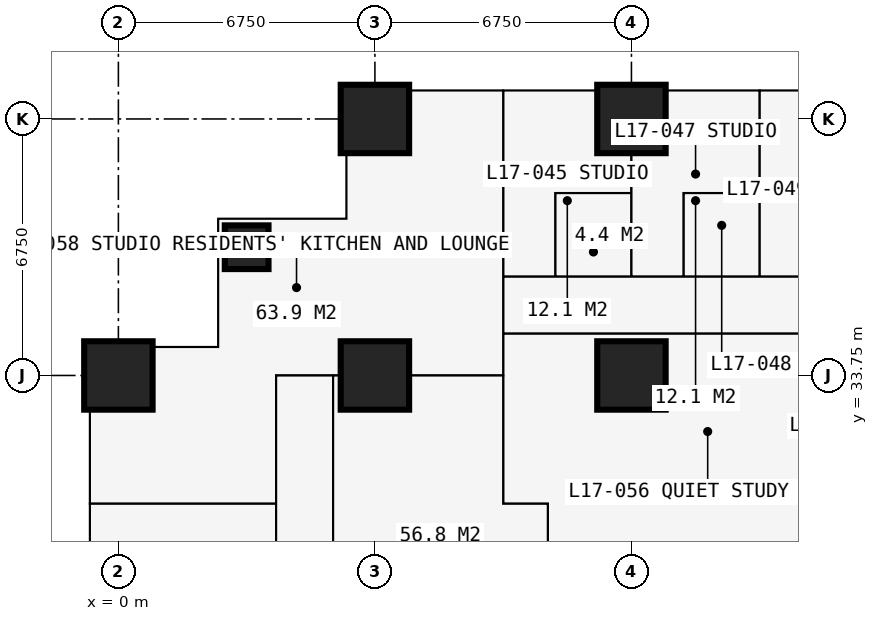
"""IFC4 building model, lengths in metres.
Left out: names, types, materials, properties, quantities, classifications, styles, units other than length and angle.
Written with IfcOpenShell. Run it as: python <this file> out.ifc"""

import sys

from ifc_helpers import new_model, si_unit, direction, frame, frame_2d, origin, origin_2d, place, context, subcontext, project, spatial, rectangle, extrude, element, fill, save


model = new_model("IFC4")
c1 = context("Model", 3, precision=1e-05, world=origin(), true_north=direction((0.0, 1.0)))
c2 = subcontext(c1, "Body", "Model", "MODEL_VIEW")
j1 = project(units=[si_unit("LENGTHUNIT", "METRE"), si_unit("PLANEANGLEUNIT", "RADIAN")], contexts=[c1])
p1 = place(None, origin())
s1 = spatial("IfcSite", under=j1, at=p1, CompositionType="ELEMENT")
p2 = place(p1, origin())
s2 = spatial("IfcBuilding", under=s1, at=p2, CompositionType="ELEMENT")
p3 = place(p2, frame((0.0, 0.0, 64.8)))
s3 = spatial("IfcBuildingStorey", under=s2, at=p3, CompositionType="ELEMENT", Elevation=64.8)
p4 = place(p3, frame((0.0, 33.75, 0.0), z_axis=(0.0, 0.0, 1.0), x_axis=(1.0, 0.0, 0.0)))
e1 = element("IfcColumn", 1, at=p4, inside=s3, PredefinedType="COLUMN", context=c2, shape_type="SweptSolid", body=[
    extrude(rectangle(XDim=1.8, YDim=1.8, at=origin_2d()), origin(), (0.0, 0.0, 1.0), 3.6),
])
p5 = place(p3, frame((3.375, 37.125, 0.0), z_axis=(0.0, 0.0, 1.0), x_axis=(1.0, 0.0, 0.0)))
e2 = element("IfcColumn", 2, at=p5, inside=s3, PredefinedType="COLUMN", context=c2, shape_type="SweptSolid", body=[
    extrude(rectangle(XDim=1.15, YDim=1.15, at=origin_2d()), origin(), (0.0, 0.0, 1.0), 3.6),
])
for number, where, z_axis, x_axis in (
    (3, (6.75, 33.75, 0.0), (0.0, 0.0, 1.0), (1.0, 0.0, 0.0)),
    (4, (6.75, 40.5, 0.0), (0.0, 0.0, 1.0), (1.0, 0.0, 0.0)),
    (5, (13.5, 33.75, 0.0), (0.0, 0.0, 1.0), (1.0, 0.0, 0.0)),
    (6, (13.5, 40.5, 0.0), (0.0, 0.0, 1.0), (1.0, 0.0, 0.0)),
):
    element("IfcColumn", number, at=place(p3, frame(where, z_axis=z_axis, x_axis=x_axis)), inside=s3, PredefinedType="COLUMN", context=c2, shape_type="SweptSolid", body=[
        extrude(rectangle(XDim=1.8, YDim=1.8, at=origin_2d()), origin(), (0.0, 0.0, 1.0), 3.6),
    ])
p6 = place(p3, frame((6.0, 41.25, 0.0), z_axis=(0.0, 0.0, 1.0), x_axis=(0.0, -1.0, 0.0)))
e7 = element("IfcWall", 7, at=p6, inside=s3, PredefinedType="SOLIDWALL", context=c2, shape_type="SweptSolid", body=[
    extrude(rectangle(XDim=3.375, YDim=0.3, at=frame_2d((1.688, 0.0))), origin(), (0.0, 0.0, 1.0), 3.375),
])
p7 = place(p6, frame((1.833, 0.0, 0.9)))
e8 = element("IfcOpeningElement", 8, at=p7, cuts=e7, PredefinedType="OPENING", context=c2, shape_type="SweptSolid", body=[
    extrude(rectangle(XDim=1.2, YDim=1.8, at=frame_2d((0.6, 0.9))), frame((0.0, 0.16, 0.0), z_axis=(0.0, -1.0, 0.0), x_axis=(1.0, 0.0, 0.0)), (0.0, 0.0, 1.0), 0.32),
])
p8 = place(p3, frame((6.0, 37.875, 0.0), z_axis=(0.0, 0.0, 1.0), x_axis=(-1.0, 0.0, 0.0)))
e9 = element("IfcWall", 9, at=p8, inside=s3, PredefinedType="SOLIDWALL", context=c2, shape_type="SweptSolid", body=[
    extrude(rectangle(XDim=3.375, YDim=0.3, at=frame_2d((1.688, 0.0))), origin(), (0.0, 0.0, 1.0), 3.375),
])
p9 = place(p8, frame((0.788, 0.0, 0.6)))
e10 = element("IfcOpeningElement", 10, at=p9, cuts=e9, PredefinedType="OPENING", context=c2, shape_type="SweptSolid", body=[
    extrude(rectangle(XDim=1.8, YDim=2.1, at=frame_2d((0.9, 1.05))), frame((0.0, 0.16, 0.0), z_axis=(0.0, -1.0, 0.0), x_axis=(1.0, 0.0, 0.0)), (0.0, 0.0, 1.0), 0.32),
])
p10 = place(p3, frame((2.625, 37.875, 0.0), z_axis=(0.0, 0.0, 1.0), x_axis=(0.0, -1.0, 0.0)))
e11 = element("IfcWall", 11, at=p10, inside=s3, PredefinedType="SOLIDWALL", context=c2, shape_type="SweptSolid", body=[
    extrude(rectangle(XDim=3.375, YDim=0.3, at=frame_2d((1.688, 0.0))), origin(), (0.0, 0.0, 1.0), 3.375),
])
p11 = place(p10, frame((0.788, 0.0, 0.6)))
e12 = element("IfcOpeningElement", 12, at=p11, cuts=e11, PredefinedType="OPENING", context=c2, shape_type="SweptSolid", body=[
    extrude(rectangle(XDim=1.8, YDim=2.1, at=frame_2d((0.9, 1.05))), frame((0.0, 0.16, 0.0), z_axis=(0.0, -1.0, 0.0), x_axis=(1.0, 0.0, 0.0)), (0.0, 0.0, 1.0), 0.32),
])
p12 = place(p3, frame((2.625, 34.5, 0.0), z_axis=(0.0, 0.0, 1.0), x_axis=(-1.0, 0.0, 0.0)))
e13 = element("IfcWall", 13, at=p12, inside=s3, PredefinedType="SOLIDWALL", context=c2, shape_type="SweptSolid", body=[
    extrude(rectangle(XDim=3.375, YDim=0.3, at=frame_2d((1.688, 0.0))), origin(), (0.0, 0.0, 1.0), 3.375),
])
p13 = place(p12, frame((0.343, 0.0, 0.9)))
e14 = element("IfcOpeningElement", 14, at=p13, cuts=e13, PredefinedType="OPENING", context=c2, shape_type="SweptSolid", body=[
    extrude(rectangle(XDim=1.2, YDim=1.8, at=frame_2d((0.6, 0.9))), frame((0.0, 0.16, 0.0), z_axis=(0.0, -1.0, 0.0), x_axis=(1.0, 0.0, 0.0)), (0.0, 0.0, 1.0), 0.32),
])
p14 = place(p3, frame((-0.734, 30.375, 0.0), z_axis=(0.0, 0.0, 1.0), x_axis=(1.0, 0.0, 0.0)))
e15 = element("IfcWall", 15, at=p14, inside=s3, PredefinedType="PARTITIONING", context=c2, shape_type="SweptSolid", body=[
    extrude(rectangle(XDim=4.884, YDim=0.15, at=frame_2d((2.442, 0.0))), origin(), (0.0, 0.0, 1.0), 3.375),
])
p15 = place(p3, frame((4.15, 10.125, 0.0), z_axis=(0.0, 0.0, 1.0), x_axis=(0.0, 1.0, 0.0)))
e16 = element("IfcWall", 16, at=p15, inside=s3, PredefinedType="PARTITIONING", context=c2, shape_type="SweptSolid", body=[
    extrude(rectangle(XDim=23.625, YDim=0.15, at=frame_2d((11.812, 0.0))), origin(), (0.0, 0.0, 1.0), 3.375),
])
p16 = place(p15, frame((4.2, 0.0, 0.0)))
e17 = element("IfcOpeningElement", 17, at=p16, cuts=e16, PredefinedType="OPENING", context=c2, shape_type="SweptSolid", body=[
    extrude(rectangle(XDim=0.95, YDim=2.2, at=frame_2d((0.475, 1.1))), frame((0.0, 0.085, 0.0), z_axis=(0.0, -1.0, 0.0), x_axis=(1.0, 0.0, 0.0)), (0.0, 0.0, 1.0), 0.17),
])
p17 = place(p15, frame((10.95, 0.0, 0.0)))
e18 = element("IfcOpeningElement", 18, at=p17, cuts=e16, PredefinedType="OPENING", context=c2, shape_type="SweptSolid", body=[
    extrude(rectangle(XDim=0.95, YDim=2.2, at=frame_2d((0.475, 1.1))), frame((0.0, 0.085, 0.0), z_axis=(0.0, -1.0, 0.0), x_axis=(1.0, 0.0, 0.0)), (0.0, 0.0, 1.0), 0.17),
])
p18 = place(p15, frame((17.7, 0.0, 0.0)))
e19 = element("IfcOpeningElement", 19, at=p18, cuts=e16, PredefinedType="OPENING", context=c2, shape_type="SweptSolid", body=[
    extrude(rectangle(XDim=0.95, YDim=2.2, at=frame_2d((0.475, 1.1))), frame((0.0, 0.085, 0.0), z_axis=(0.0, -1.0, 0.0), x_axis=(1.0, 0.0, 0.0)), (0.0, 0.0, 1.0), 0.17),
])
p19 = place(p3, frame((4.15, 33.75, 0.0), z_axis=(0.0, 0.0, 1.0), x_axis=(1.0, 0.0, 0.0)))
e20 = element("IfcWall", 20, at=p19, inside=s3, PredefinedType="PARTITIONING", context=c2, shape_type="SweptSolid", body=[
    extrude(rectangle(XDim=5.975, YDim=0.15, at=frame_2d((2.988, 0.0))), origin(), (0.0, 0.0, 1.0), 2.877),
])
p20 = place(p3, frame((5.65, 22.988, 0.0), z_axis=(0.0, 0.0, 1.0), x_axis=(0.0, 1.0, 0.0)))
e21 = element("IfcWall", 21, at=p20, inside=s3, PredefinedType="PARTITIONING", context=c2, shape_type="SweptSolid", body=[
    extrude(rectangle(XDim=10.762, YDim=0.15, at=frame_2d((5.381, 0.0))), origin(), (0.0, 0.0, 1.0), 3.375),
])
p21 = place(p20, frame((4.95, 0.0, 0.0)))
e22 = element("IfcOpeningElement", 22, at=p21, cuts=e21, PredefinedType="OPENING", context=c2, shape_type="SweptSolid", body=[
    extrude(rectangle(XDim=0.95, YDim=2.2, at=frame_2d((0.475, 1.1))), frame((0.0, 0.085, 0.0), z_axis=(0.0, -1.0, 0.0), x_axis=(1.0, 0.0, 0.0)), (0.0, 0.0, 1.0), 0.17),
])
p22 = place(p3, frame((10.125, 30.375, 0.0), z_axis=(0.0, 0.0, 1.0), x_axis=(0.0, 1.0, 0.0)))
e23 = element("IfcWall", 23, at=p22, inside=s3, PredefinedType="PARTITIONING", context=c2, shape_type="SweptSolid", body=[
    extrude(rectangle(XDim=10.859, YDim=0.15, at=frame_2d((5.429, 0.0))), origin(), (0.0, 0.0, 1.0), 3.375),
])
p23 = place(p22, frame((4.725, 0.0, 0.0)))
e24 = element("IfcOpeningElement", 24, at=p23, cuts=e23, PredefinedType="OPENING", context=c2, shape_type="SweptSolid", body=[
    extrude(rectangle(XDim=1.0, YDim=2.2, at=frame_2d((0.5, 1.1))), frame((0.0, 0.085, 0.0), z_axis=(0.0, -1.0, 0.0), x_axis=(1.0, 0.0, 0.0)), (0.0, 0.0, 1.0), 0.17),
])
p24 = place(p3, frame((10.125, 30.375, 0.0), z_axis=(0.0, 0.0, 1.0), x_axis=(1.0, 0.0, 0.0)))
e25 = element("IfcWall", 25, at=p24, inside=s3, PredefinedType="PARTITIONING", context=c2, shape_type="SweptSolid", body=[
    extrude(rectangle(XDim=1.175, YDim=0.15, at=frame_2d((0.587, 0.0))), origin(), (0.0, 0.0, 1.0), 3.375),
])
p25 = place(p3, frame((10.125, 34.85, 0.0), z_axis=(0.0, 0.0, 1.0), x_axis=(1.0, 0.0, 0.0)))
e26 = element("IfcWall", 26, at=p25, inside=s3, PredefinedType="PARTITIONING", context=c2, shape_type="SweptSolid", body=[
    extrude(rectangle(XDim=10.762, YDim=0.15, at=frame_2d((5.381, 0.0))), origin(), (0.0, 0.0, 1.0), 3.375),
])
p26 = place(p25, frame((4.9, 0.0, 0.0)))
e27 = element("IfcOpeningElement", 27, at=p26, cuts=e26, PredefinedType="OPENING", context=c2, shape_type="SweptSolid", body=[
    extrude(rectangle(XDim=0.95, YDim=2.2, at=frame_2d((0.475, 1.1))), frame((0.0, 0.085, 0.0), z_axis=(0.0, -1.0, 0.0), x_axis=(1.0, 0.0, 0.0)), (0.0, 0.0, 1.0), 0.17),
])
p27 = place(p3, frame((10.125, 36.35, 0.0), z_axis=(0.0, 0.0, 1.0), x_axis=(1.0, 0.0, 0.0)))
e28 = element("IfcWall", 28, at=p27, inside=s3, PredefinedType="PARTITIONING", context=c2, shape_type="SweptSolid", body=[
    extrude(rectangle(XDim=23.625, YDim=0.1, at=frame_2d((11.812, 0.0))), origin(), (0.0, 0.0, 1.0), 3.375),
])
p28 = place(p27, frame((0.2, 0.0, 0.0)))
e29 = element("IfcOpeningElement", 29, at=p28, cuts=e28, PredefinedType="OPENING", context=c2, shape_type="SweptSolid", body=[
    extrude(rectangle(XDim=0.95, YDim=2.2, at=frame_2d((0.475, 1.1))), frame((0.0, 0.06, 0.0), z_axis=(0.0, -1.0, 0.0), x_axis=(1.0, 0.0, 0.0)), (0.0, 0.0, 1.0), 0.12),
])
p29 = place(p27, frame((3.625, 0.0, 0.0)))
e30 = element("IfcOpeningElement", 30, at=p29, cuts=e28, PredefinedType="OPENING", context=c2, shape_type="SweptSolid", body=[
    extrude(rectangle(XDim=0.95, YDim=2.2, at=frame_2d((0.475, 1.1))), frame((0.0, 0.06, 0.0), z_axis=(0.0, -1.0, 0.0), x_axis=(1.0, 0.0, 0.0)), (0.0, 0.0, 1.0), 0.12),
])
p30 = place(p27, frame((7.0, 0.0, 0.0)))
e31 = element("IfcOpeningElement", 31, at=p30, cuts=e28, PredefinedType="OPENING", context=c2, shape_type="SweptSolid", body=[
    extrude(rectangle(XDim=0.95, YDim=2.2, at=frame_2d((0.475, 1.1))), frame((0.0, 0.06, 0.0), z_axis=(0.0, -1.0, 0.0), x_axis=(1.0, 0.0, 0.0)), (0.0, 0.0, 1.0), 0.12),
])
p31 = place(p27, frame((10.375, 0.0, 0.0)))
e32 = element("IfcOpeningElement", 32, at=p31, cuts=e28, PredefinedType="OPENING", context=c2, shape_type="SweptSolid", body=[
    extrude(rectangle(XDim=0.95, YDim=2.2, at=frame_2d((0.475, 1.1))), frame((0.0, 0.06, 0.0), z_axis=(0.0, -1.0, 0.0), x_axis=(1.0, 0.0, 0.0)), (0.0, 0.0, 1.0), 0.12),
])
p32 = place(p27, frame((13.75, 0.0, 0.0)))
e33 = element("IfcOpeningElement", 33, at=p32, cuts=e28, PredefinedType="OPENING", context=c2, shape_type="SweptSolid", body=[
    extrude(rectangle(XDim=0.95, YDim=2.2, at=frame_2d((0.475, 1.1))), frame((0.0, 0.06, 0.0), z_axis=(0.0, -1.0, 0.0), x_axis=(1.0, 0.0, 0.0)), (0.0, 0.0, 1.0), 0.12),
])
p33 = place(p3, frame((11.3, 11.3, 0.0), z_axis=(0.0, 0.0, 1.0), x_axis=(0.0, 1.0, 0.0)))
e34 = element("IfcWall", 34, at=p33, inside=s3, PredefinedType="PARTITIONING", context=c2, shape_type="SweptSolid", body=[
    extrude(rectangle(XDim=19.075, YDim=0.15, at=frame_2d((9.538, 0.0))), origin(), (0.0, 0.0, 1.0), 3.375),
])
p34 = place(p33, frame((10.137, 0.0, 0.0)))
e35 = element("IfcOpeningElement", 35, at=p34, cuts=e34, PredefinedType="OPENING", context=c2, shape_type="SweptSolid", body=[
    extrude(rectangle(XDim=1.0, YDim=2.2, at=frame_2d((0.5, 1.1))), frame((0.0, 0.085, 0.0), z_axis=(0.0, -1.0, 0.0), x_axis=(1.0, 0.0, 0.0)), (0.0, 0.0, 1.0), 0.17),
])
p35 = place(p3, frame((11.5, 36.35, 0.0), z_axis=(0.0, 0.0, 1.0), x_axis=(0.0, 1.0, 0.0)))
e36 = element("IfcWall", 36, at=p35, inside=s3, PredefinedType="PARTITIONING", context=c2, shape_type="SweptSolid", body=[
    extrude(rectangle(XDim=2.2, YDim=0.1, at=frame_2d((1.1, 0.0))), origin(), (0.0, 0.0, 1.0), 3.375),
])
p36 = place(p35, frame((0.65, 0.0, 0.0)))
e37 = element("IfcOpeningElement", 37, at=p36, cuts=e36, PredefinedType="OPENING", context=c2, shape_type="SweptSolid", body=[
    extrude(rectangle(XDim=0.9, YDim=2.2, at=frame_2d((0.45, 1.1))), frame((0.0, 0.06, 0.0), z_axis=(0.0, -1.0, 0.0), x_axis=(1.0, 0.0, 0.0)), (0.0, 0.0, 1.0), 0.12),
])
p37 = place(p3, frame((11.5, 38.55, 0.0), z_axis=(0.0, 0.0, 1.0), x_axis=(1.0, 0.0, 0.0)))
e38 = element("IfcWall", 38, at=p37, inside=s3, PredefinedType="PARTITIONING", context=c2, shape_type="SweptSolid", body=[
    extrude(rectangle(XDim=2.0, YDim=0.1, at=frame_2d((1.0, 0.0))), origin(), (0.0, 0.0, 1.0), 3.375),
])
p38 = place(p3, frame((13.5, 36.35, 0.0), z_axis=(0.0, 0.0, 1.0), x_axis=(0.0, 1.0, 0.0)))
e39 = element("IfcWall", 39, at=p38, inside=s3, PredefinedType="PARTITIONING", context=c2, shape_type="SweptSolid", body=[
    extrude(rectangle(XDim=4.884, YDim=0.175, at=frame_2d((2.442, 0.0))), origin(), (0.0, 0.0, 1.0), 2.61),
])
p39 = place(p3, frame((14.875, 36.35, 0.0), z_axis=(0.0, 0.0, 1.0), x_axis=(0.0, 1.0, 0.0)))
e40 = element("IfcWall", 40, at=p39, inside=s3, PredefinedType="PARTITIONING", context=c2, shape_type="SweptSolid", body=[
    extrude(rectangle(XDim=2.2, YDim=0.1, at=frame_2d((1.1, 0.0))), origin(), (0.0, 0.0, 1.0), 3.375),
])
p40 = place(p39, frame((0.65, 0.0, 0.0)))
e41 = element("IfcOpeningElement", 41, at=p40, cuts=e40, PredefinedType="OPENING", context=c2, shape_type="SweptSolid", body=[
    extrude(rectangle(XDim=0.9, YDim=2.2, at=frame_2d((0.45, 1.1))), frame((0.0, 0.06, 0.0), z_axis=(0.0, -1.0, 0.0), x_axis=(1.0, 0.0, 0.0)), (0.0, 0.0, 1.0), 0.12),
])
p41 = place(p3, frame((14.875, 38.55, 0.0), z_axis=(0.0, 0.0, 1.0), x_axis=(1.0, 0.0, 0.0)))
e42 = element("IfcWall", 42, at=p41, inside=s3, PredefinedType="PARTITIONING", context=c2, shape_type="SweptSolid", body=[
    extrude(rectangle(XDim=2.0, YDim=0.1, at=frame_2d((1.0, 0.0))), origin(), (0.0, 0.0, 1.0), 3.375),
])
p42 = place(p3, frame((16.875, 36.35, 0.0), z_axis=(0.0, 0.0, 1.0), x_axis=(0.0, 1.0, 0.0)))
e43 = element("IfcWall", 43, at=p42, inside=s3, PredefinedType="PARTITIONING", context=c2, shape_type="SweptSolid", body=[
    extrude(rectangle(XDim=4.884, YDim=0.175, at=frame_2d((2.442, 0.0))), origin(), (0.0, 0.0, 1.0), 3.375),
])
p43 = place(p7, origin())
e44 = element("IfcWindow", 44, at=p43, inside=s3, PartitioningType="SINGLE_PANEL", PredefinedType="WINDOW", context=c2, shape_type="SweptSolid", body=[
    extrude(rectangle(XDim=1.2, YDim=1.8, at=frame_2d((0.6, 0.9))), frame((0.0, 0.03, 0.0), z_axis=(0.0, -1.0, 0.0), x_axis=(1.0, 0.0, 0.0)), (0.0, 0.0, 1.0), 0.06),
])
fill(e8, e44)
p44 = place(p9, origin())
e45 = element("IfcWindow", 45, at=p44, inside=s3, PartitioningType="SINGLE_PANEL", PredefinedType="WINDOW", context=c2, shape_type="SweptSolid", body=[
    extrude(rectangle(XDim=1.8, YDim=2.1, at=frame_2d((0.9, 1.05))), frame((0.0, 0.03, 0.0), z_axis=(0.0, -1.0, 0.0), x_axis=(1.0, 0.0, 0.0)), (0.0, 0.0, 1.0), 0.06),
])
fill(e10, e45)
p45 = place(p11, origin())
e46 = element("IfcWindow", 46, at=p45, inside=s3, PartitioningType="SINGLE_PANEL", PredefinedType="WINDOW", context=c2, shape_type="SweptSolid", body=[
    extrude(rectangle(XDim=1.8, YDim=2.1, at=frame_2d((0.9, 1.05))), frame((0.0, 0.03, 0.0), z_axis=(0.0, -1.0, 0.0), x_axis=(1.0, 0.0, 0.0)), (0.0, 0.0, 1.0), 0.06),
])
fill(e12, e46)
p46 = place(p13, origin())
e47 = element("IfcWindow", 47, at=p46, inside=s3, PartitioningType="SINGLE_PANEL", PredefinedType="WINDOW", context=c2, shape_type="SweptSolid", body=[
    extrude(rectangle(XDim=1.2, YDim=1.8, at=frame_2d((0.6, 0.9))), frame((0.0, 0.03, 0.0), z_axis=(0.0, -1.0, 0.0), x_axis=(1.0, 0.0, 0.0)), (0.0, 0.0, 1.0), 0.06),
])
fill(e14, e47)
p47 = place(p28, origin())
e48 = element("IfcDoor", 48, at=p47, inside=s3, OperationType="SINGLE_SWING_LEFT", PredefinedType="DOOR", context=c2, shape_type="SweptSolid", body=[
    extrude(rectangle(XDim=0.95, YDim=2.2, at=frame_2d((0.475, 1.1))), frame((0.0, 0.025, 0.0), z_axis=(0.0, -1.0, 0.0), x_axis=(1.0, 0.0, 0.0)), (0.0, 0.0, 1.0), 0.05),
])
fill(e29, e48)
p48 = place(p36, origin())
e49 = element("IfcDoor", 49, at=p48, inside=s3, OperationType="SINGLE_SWING_RIGHT", PredefinedType="DOOR", context=c2, shape_type="SweptSolid", body=[
    extrude(rectangle(XDim=0.9, YDim=2.2, at=frame_2d((0.45, 1.1))), frame((0.0, 0.025, 0.0), z_axis=(0.0, -1.0, 0.0), x_axis=(1.0, 0.0, 0.0)), (0.0, 0.0, 1.0), 0.05),
])
fill(e37, e49)
p49 = place(p29, origin())
e50 = element("IfcDoor", 50, at=p49, inside=s3, OperationType="SINGLE_SWING_LEFT", PredefinedType="DOOR", context=c2, shape_type="SweptSolid", body=[
    extrude(rectangle(XDim=0.95, YDim=2.2, at=frame_2d((0.475, 1.1))), frame((0.0, 0.025, 0.0), z_axis=(0.0, -1.0, 0.0), x_axis=(1.0, 0.0, 0.0)), (0.0, 0.0, 1.0), 0.05),
])
fill(e30, e50)
p50 = place(p40, origin())
e51 = element("IfcDoor", 51, at=p50, inside=s3, OperationType="SINGLE_SWING_RIGHT", PredefinedType="DOOR", context=c2, shape_type="SweptSolid", body=[
    extrude(rectangle(XDim=0.9, YDim=2.2, at=frame_2d((0.45, 1.1))), frame((0.0, 0.025, 0.0), z_axis=(0.0, -1.0, 0.0), x_axis=(1.0, 0.0, 0.0)), (0.0, 0.0, 1.0), 0.05),
])
fill(e41, e51)
p51 = place(p30, origin())
e52 = element("IfcDoor", 52, at=p51, inside=s3, OperationType="SINGLE_SWING_LEFT", PredefinedType="DOOR", context=c2, shape_type="SweptSolid", body=[
    extrude(rectangle(XDim=0.95, YDim=2.2, at=frame_2d((0.475, 1.1))), frame((0.0, 0.025, 0.0), z_axis=(0.0, -1.0, 0.0), x_axis=(1.0, 0.0, 0.0)), (0.0, 0.0, 1.0), 0.05),
])
fill(e31, e52)
p52 = place(p26, origin())
e53 = element("IfcDoor", 53, at=p52, inside=s3, OperationType="SINGLE_SWING_LEFT", PredefinedType="DOOR", context=c2, shape_type="SweptSolid", body=[
    extrude(rectangle(XDim=0.95, YDim=2.2, at=frame_2d((0.475, 1.1))), frame((0.0, 0.025, 0.0), z_axis=(0.0, -1.0, 0.0), x_axis=(1.0, 0.0, 0.0)), (0.0, 0.0, 1.0), 0.05),
])
fill(e27, e53)
p53 = place(p23, origin())
e54 = element("IfcDoor", 54, at=p53, inside=s3, OperationType="SINGLE_SWING_LEFT", PredefinedType="DOOR", context=c2, shape_type="SweptSolid", body=[
    extrude(rectangle(XDim=1.0, YDim=2.2, at=frame_2d((0.5, 1.1))), frame((0.0, 0.025, 0.0), z_axis=(0.0, -1.0, 0.0), x_axis=(1.0, 0.0, 0.0)), (0.0, 0.0, 1.0), 0.05),
])
fill(e24, e54)
save(model, sys.argv[1])
